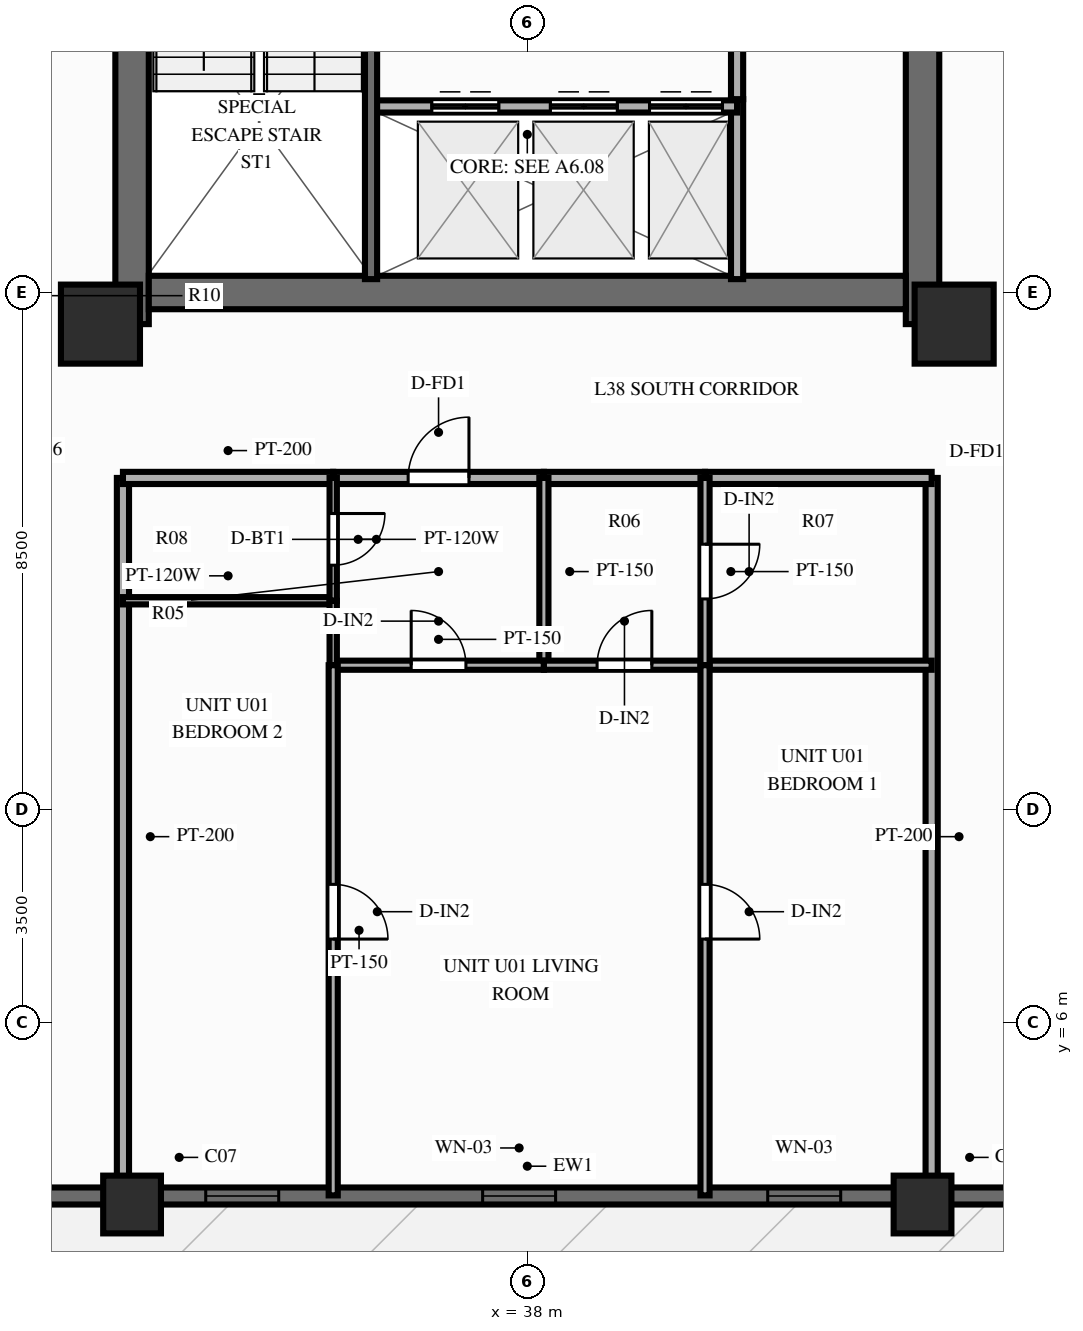
"""IFC4 building model, lengths in metres.
Left out: names, types, materials, properties, quantities, classifications, styles, units other than length and angle.
Written with IfcOpenShell. Run it as: python <this file> out.ifc"""

import sys

from ifc_helpers import new_model, si_unit, direction, frame, frame_2d, origin, origin_2d, place, context, subcontext, project, spatial, rectangle, extrude, source, transform, mapped, element, fill, save


model = new_model("IFC4")
c1 = context("Model", 3, precision=1e-05, world=origin(), true_north=direction((0.0, 1.0)))
c2 = subcontext(c1, "Body", "Model", "MODEL_VIEW")
j1 = project(units=[si_unit("LENGTHUNIT", "METRE"), si_unit("PLANEANGLEUNIT", "RADIAN")], contexts=[c1])
p1 = place(None, origin())
s1 = spatial("IfcSite", under=j1, at=p1, CompositionType="ELEMENT")
p2 = place(p1, origin())
s2 = spatial("IfcBuilding", under=s1, at=p2, CompositionType="ELEMENT")
p3 = place(p2, frame((0.0, 0.0, 119.85)))
s3 = spatial("IfcBuildingStorey", under=s2, at=p3, CompositionType="ELEMENT", Elevation=119.85)
p4 = place(p3, frame((31.5, 17.48, 0.0), z_axis=(0.0, 0.0, 1.0), x_axis=(0.0, 1.0, 0.0)))
e1 = element("IfcWall", 1, at=p4, inside=s3, PredefinedType="SHEAR", context=c2, shape_type="SweptSolid", body=[
    extrude(rectangle(XDim=19.04, YDim=0.55, at=frame_2d((9.52, 0.0))), origin(), (0.0, 0.0, 1.0), 3.0),
])
p5 = place(p4, frame((6.32, 0.0, 0.0)))
e2 = element("IfcOpeningElement", 2, at=p5, cuts=e1, PredefinedType="OPENING", context=c2, shape_type="SweptSolid", body=[
    extrude(rectangle(XDim=1.1, YDim=2.15, at=frame_2d((0.55, 1.075))), frame((0.0, 0.287, 0.0), z_axis=(0.0, -1.0, 0.0), x_axis=(1.0, 0.0, 0.0)), (0.0, 0.0, 1.0), 0.574),
])
p6 = place(p3, frame((44.5, 17.48, 0.0), z_axis=(0.0, 0.0, 1.0), x_axis=(0.0, 1.0, 0.0)))
e3 = element("IfcWall", 3, at=p6, inside=s3, PredefinedType="SHEAR", context=c2, shape_type="SweptSolid", body=[
    extrude(rectangle(XDim=19.04, YDim=0.55, at=frame_2d((9.52, 0.0))), origin(), (0.0, 0.0, 1.0), 3.0),
])
p7 = place(p6, frame((12.67, 0.0, 0.0), z_axis=(0.0, 0.0, 1.0), x_axis=(-1.0, 0.0, 0.0)))
e4 = element("IfcOpeningElement", 4, at=p7, cuts=e3, PredefinedType="OPENING", context=c2, shape_type="SweptSolid", body=[
    extrude(rectangle(XDim=1.1, YDim=2.15, at=frame_2d((0.55, 1.075))), frame((0.0, 0.287, 0.0), z_axis=(0.0, -1.0, 0.0), x_axis=(1.0, 0.0, 0.0)), (0.0, 0.0, 1.0), 0.574),
])
p8 = place(p3, frame((31.775, 18.0, 0.0), z_axis=(0.0, 0.0, 1.0), x_axis=(1.0, 0.0, 0.0)))
e5 = element("IfcWall", 5, at=p8, inside=s3, PredefinedType="SHEAR", context=c2, shape_type="SweptSolid", body=[
    extrude(rectangle(XDim=12.45, YDim=0.55, at=frame_2d((6.225, 0.0))), origin(), (0.0, 0.0, 1.0), 3.0),
])
m1 = source(origin(), c2, "Body", "SweptSolid", [
    extrude(rectangle(XDim=1.3, YDim=1.3, at=origin_2d()), origin(), (0.0, 0.0, 1.0), 3.0),
])
for number, where, z_axis, x_axis in (
    (6, (30.98, 17.48, 0.0), (0.0, 0.0, 1.0), (1.0, 0.0, 0.0)),
    (7, (45.02, 17.48, 0.0), (0.0, 0.0, 1.0), (1.0, 0.0, 0.0)),
):
    element("IfcColumn", number, at=place(p3, frame(where, z_axis=z_axis, x_axis=x_axis)), inside=s3, PredefinedType="COLUMN", context=c2, shape_type="MappedRepresentation", body=[
        mapped(m1, transform((0.0, 0.0, 0.0), scale=1.0)),
    ])
m2 = source(origin(), c2, "Body", "SweptSolid", [
    extrude(rectangle(XDim=0.95, YDim=0.95, at=origin_2d()), origin(), (0.0, 0.0, 1.0), 3.0),
])
for number, where, z_axis, x_axis in (
    (8, (31.5, 3.0, 0.0), (0.0, 0.0, 1.0), (1.0, 0.0, 0.0)),
    (9, (44.5, 3.0, 0.0), (0.0, 0.0, 1.0), (1.0, 0.0, 0.0)),
):
    element("IfcColumn", number, at=place(p3, frame(where, z_axis=z_axis, x_axis=x_axis)), inside=s3, PredefinedType="COLUMN", context=c2, shape_type="MappedRepresentation", body=[
        mapped(m2, transform((0.0, 0.0, 0.0), scale=1.0)),
    ])
p9 = place(p3, frame((16.2, 3.14, 0.0), z_axis=(0.0, 0.0, 1.0), x_axis=(1.0, 0.0, 0.0)))
e10 = element("IfcWall", 10, at=p9, inside=s3, PredefinedType="SOLIDWALL", context=c2, shape_type="SweptSolid", body=[
    extrude(rectangle(XDim=43.6, YDim=0.28, at=frame_2d((21.8, 0.0))), origin(), (0.0, 0.0, 1.0), 2.28),
])
p10 = place(p9, frame((8.2, 0.0, 0.0), z_axis=(0.0, 0.0, 1.0), x_axis=(-1.0, 0.0, 0.0)))
e11 = element("IfcOpeningElement", 11, at=p10, cuts=e10, PredefinedType="OPENING", context=c2, shape_type="SweptSolid", body=[
    extrude(rectangle(XDim=1.1, YDim=2.15, at=frame_2d((0.55, 1.075))), frame((0.0, 0.152, 0.0), z_axis=(0.0, -1.0, 0.0), x_axis=(1.0, 0.0, 0.0)), (0.0, 0.0, 1.0), 0.304),
])
p11 = place(p9, frame((16.511, 0.0, 0.25)))
e12 = element("IfcOpeningElement", 12, at=p11, cuts=e10, PredefinedType="OPENING", context=c2, shape_type="SweptSolid", body=[
    extrude(rectangle(XDim=1.2, YDim=1.5, at=frame_2d((0.6, 0.75))), frame((0.0, 0.152, 0.0), z_axis=(0.0, -1.0, 0.0), x_axis=(1.0, 0.0, 0.0)), (0.0, 0.0, 1.0), 0.304),
])
p12 = place(p9, frame((21.065, 0.0, 0.25)))
e13 = element("IfcOpeningElement", 13, at=p12, cuts=e10, PredefinedType="OPENING", context=c2, shape_type="SweptSolid", body=[
    extrude(rectangle(XDim=1.2, YDim=1.5, at=frame_2d((0.6, 0.75))), frame((0.0, 0.152, 0.0), z_axis=(0.0, -1.0, 0.0), x_axis=(1.0, 0.0, 0.0)), (0.0, 0.0, 1.0), 0.304),
])
p13 = place(p9, frame((25.754, 0.0, 0.25)))
e14 = element("IfcOpeningElement", 14, at=p13, cuts=e10, PredefinedType="OPENING", context=c2, shape_type="SweptSolid", body=[
    extrude(rectangle(XDim=1.2, YDim=1.5, at=frame_2d((0.6, 0.75))), frame((0.0, 0.152, 0.0), z_axis=(0.0, -1.0, 0.0), x_axis=(1.0, 0.0, 0.0)), (0.0, 0.0, 1.0), 0.304),
])
p14 = place(p9, frame((35.35, 0.0, 0.25)))
e15 = element("IfcOpeningElement", 15, at=p14, cuts=e10, PredefinedType="OPENING", context=c2, shape_type="SweptSolid", body=[
    extrude(rectangle(XDim=1.2, YDim=1.5, at=frame_2d((0.6, 0.75))), frame((0.0, 0.152, 0.0), z_axis=(0.0, -1.0, 0.0), x_axis=(1.0, 0.0, 0.0)), (0.0, 0.0, 1.0), 0.304),
])
p15 = place(p3, frame((41.45, 18.22, 0.0), z_axis=(0.0, 0.0, 1.0), x_axis=(0.0, 1.0, 0.0)))
e16 = element("IfcWall", 16, at=p15, inside=s3, PredefinedType="PARTITIONING", context=c2, shape_type="SweptSolid", body=[
    extrude(rectangle(XDim=2.96, YDim=0.2, at=frame_2d((1.48, 0.0))), origin(), (0.0, 0.0, 1.0), 2.79),
])
p16 = place(p3, frame((41.45, 21.18, 0.0), z_axis=(0.0, 0.0, 1.0), x_axis=(0.0, 1.0, 0.0)))
e17 = element("IfcWall", 17, at=p16, inside=s3, PredefinedType="PARTITIONING", context=c2, shape_type="SweptSolid", body=[
    extrude(rectangle(XDim=7.42, YDim=0.2, at=frame_2d((3.71, 0.0))), origin(), (0.0, 0.0, 1.0), 2.79),
])
p17 = place(p16, frame((2.6, 0.0, 0.0)))
e18 = element("IfcOpeningElement", 18, at=p17, cuts=e17, PredefinedType="OPENING", context=c2, shape_type="SweptSolid", body=[
    extrude(rectangle(XDim=0.9, YDim=2.1, at=frame_2d((0.45, 1.05))), frame((0.0, 0.112, 0.0), z_axis=(0.0, -1.0, 0.0), x_axis=(1.0, 0.0, 0.0)), (0.0, 0.0, 1.0), 0.224),
])
p18 = place(p3, frame((35.43, 21.06, 0.0), z_axis=(0.0, 0.0, 1.0), x_axis=(1.0, 0.0, 0.0)))
e19 = element("IfcWall", 19, at=p18, inside=s3, PredefinedType="PARTITIONING", context=c2, shape_type="SweptSolid", body=[
    extrude(rectangle(XDim=6.02, YDim=0.2, at=frame_2d((3.01, 0.0))), origin(), (0.0, 0.0, 1.0), 2.79),
])
p19 = place(p18, frame((1.0, 0.0, 0.0)))
e20 = element("IfcOpeningElement", 20, at=p19, cuts=e19, PredefinedType="OPENING", context=c2, shape_type="SweptSolid", body=[
    extrude(rectangle(XDim=1.1, YDim=2.15, at=frame_2d((0.55, 1.075))), frame((0.0, 0.112, 0.0), z_axis=(0.0, -1.0, 0.0), x_axis=(1.0, 0.0, 0.0)), (0.0, 0.0, 1.0), 0.224),
])
p20 = place(p18, frame((2.95, 0.0, 0.0)))
e21 = element("IfcOpeningElement", 21, at=p20, cuts=e19, PredefinedType="OPENING", context=c2, shape_type="SweptSolid", body=[
    extrude(rectangle(XDim=1.1, YDim=2.15, at=frame_2d((0.55, 1.075))), frame((0.0, 0.112, 0.0), z_axis=(0.0, -1.0, 0.0), x_axis=(1.0, 0.0, 0.0)), (0.0, 0.0, 1.0), 0.224),
])
p21 = place(p18, frame((4.58, 0.0, 0.0)))
e22 = element("IfcOpeningElement", 22, at=p21, cuts=e19, PredefinedType="OPENING", context=c2, shape_type="SweptSolid", body=[
    extrude(rectangle(XDim=1.2, YDim=2.15, at=frame_2d((0.6, 1.075))), frame((0.0, 0.112, 0.0), z_axis=(0.0, -1.0, 0.0), x_axis=(1.0, 0.0, 0.0)), (0.0, 0.0, 1.0), 0.224),
])
p22 = place(p3, frame((35.43, 18.22, 0.0), z_axis=(0.0, 0.0, 1.0), x_axis=(0.0, 1.0, 0.0)))
e23 = element("IfcWall", 23, at=p22, inside=s3, PredefinedType="SOLIDWALL", context=c2, shape_type="SweptSolid", body=[
    extrude(rectangle(XDim=7.22, YDim=0.2, at=frame_2d((3.61, 0.0))), origin(), (0.0, 0.0, 1.0), 2.79),
])
p23 = place(p22, frame((6.68, 0.0, 0.0), z_axis=(0.0, 0.0, 1.0), x_axis=(-1.0, 0.0, 0.0)))
e24 = element("IfcOpeningElement", 24, at=p23, cuts=e23, PredefinedType="OPENING", context=c2, shape_type="SweptSolid", body=[
    extrude(rectangle(XDim=1.1, YDim=2.15, at=frame_2d((0.55, 1.075))), frame((0.0, 0.112, 0.0), z_axis=(0.0, -1.0, 0.0), x_axis=(1.0, 0.0, 0.0)), (0.0, 0.0, 1.0), 0.224),
])
for number, where, z_axis, x_axis in (
    (25, (31.35, 14.95, 0.0), (0.0, 0.0, 1.0), (0.0, -1.0, 0.0)),
    (26, (44.65, 14.95, 0.0), (0.0, 0.0, 1.0), (0.0, -1.0, 0.0)),
):
    element("IfcWall", number, at=place(p3, frame(where, z_axis=z_axis, x_axis=x_axis)), inside=s3, PredefinedType="PARTITIONING", context=c2, shape_type="SweptSolid", body=[
        extrude(rectangle(XDim=11.8, YDim=0.2, at=frame_2d((5.9, 0.0))), origin(), (0.0, 0.0, 1.0), 2.34),
    ])
p24 = place(p3, frame((31.35, 14.95, 0.0), z_axis=(0.0, 0.0, 1.0), x_axis=(1.0, 0.0, 0.0)))
e27 = element("IfcWall", 27, at=p24, inside=s3, PredefinedType="PARTITIONING", context=c2, shape_type="SweptSolid", body=[
    extrude(rectangle(XDim=3.458, YDim=0.2, at=frame_2d((1.729, 0.0))), origin(), (0.0, 0.0, 1.0), 2.79),
])
p25 = place(p3, frame((34.808, 14.95, 0.0), z_axis=(0.0, 0.0, 1.0), x_axis=(1.0, 0.0, 0.0)))
e28 = element("IfcWall", 28, at=p25, inside=s3, PredefinedType="PARTITIONING", context=c2, shape_type="SweptSolid", body=[
    extrude(rectangle(XDim=3.465, YDim=0.2, at=frame_2d((1.732, 0.0))), origin(), (0.0, 0.0, 1.0), 2.79),
])
p26 = place(p25, frame((1.232, 0.0, 0.0)))
e29 = element("IfcOpeningElement", 29, at=p26, cuts=e28, PredefinedType="OPENING", context=c2, shape_type="SweptSolid", body=[
    extrude(rectangle(XDim=1.0, YDim=2.15, at=frame_2d((0.5, 1.075))), frame((0.0, 0.112, 0.0), z_axis=(0.0, -1.0, 0.0), x_axis=(1.0, 0.0, 0.0)), (0.0, 0.0, 1.0), 0.224),
])
p27 = place(p3, frame((38.273, 14.95, 0.0), z_axis=(0.0, 0.0, 1.0), x_axis=(1.0, 0.0, 0.0)))
e30 = element("IfcWall", 30, at=p27, inside=s3, PredefinedType="PARTITIONING", context=c2, shape_type="SweptSolid", body=[
    extrude(rectangle(XDim=2.65, YDim=0.2, at=frame_2d((1.325, 0.0))), origin(), (0.0, 0.0, 1.0), 2.79),
])
p28 = place(p3, frame((38.273, 14.95, 0.0), z_axis=(0.0, 0.0, 1.0), x_axis=(0.0, -1.0, 0.0)))
e31 = element("IfcWall", 31, at=p28, inside=s3, PredefinedType="PARTITIONING", context=c2, shape_type="SweptSolid", body=[
    extrude(rectangle(XDim=3.08, YDim=0.15, at=frame_2d((1.54, 0.0))), origin(), (0.0, 0.0, 1.0), 2.79),
])
p29 = place(p3, frame((34.808, 11.87, 0.0), z_axis=(0.0, 0.0, 1.0), x_axis=(1.0, 0.0, 0.0)))
e32 = element("IfcWall", 32, at=p29, inside=s3, PredefinedType="PARTITIONING", context=c2, shape_type="SweptSolid", body=[
    extrude(rectangle(XDim=3.465, YDim=0.15, at=frame_2d((1.732, 0.0))), origin(), (0.0, 0.0, 1.0), 2.79),
])
p30 = place(p29, frame((1.282, 0.0, 0.0)))
e33 = element("IfcOpeningElement", 33, at=p30, cuts=e32, PredefinedType="OPENING", context=c2, shape_type="SweptSolid", body=[
    extrude(rectangle(XDim=0.9, YDim=2.1, at=frame_2d((0.45, 1.05))), frame((0.0, 0.087, 0.0), z_axis=(0.0, -1.0, 0.0), x_axis=(1.0, 0.0, 0.0)), (0.0, 0.0, 1.0), 0.174),
])
p31 = place(p3, frame((38.273, 11.87, 0.0), z_axis=(0.0, 0.0, 1.0), x_axis=(1.0, 0.0, 0.0)))
e34 = element("IfcWall", 34, at=p31, inside=s3, PredefinedType="PARTITIONING", context=c2, shape_type="SweptSolid", body=[
    extrude(rectangle(XDim=2.65, YDim=0.15, at=frame_2d((1.325, 0.0))), origin(), (0.0, 0.0, 1.0), 2.79),
])
p32 = place(p31, frame((0.875, 0.0, 0.0)))
e35 = element("IfcOpeningElement", 35, at=p32, cuts=e34, PredefinedType="OPENING", context=c2, shape_type="SweptSolid", body=[
    extrude(rectangle(XDim=0.9, YDim=2.1, at=frame_2d((0.45, 1.05))), frame((0.0, 0.087, 0.0), z_axis=(0.0, -1.0, 0.0), x_axis=(1.0, 0.0, 0.0)), (0.0, 0.0, 1.0), 0.174),
])
p33 = place(p3, frame((40.923, 14.95, 0.0), z_axis=(0.0, 0.0, 1.0), x_axis=(1.0, 0.0, 0.0)))
e36 = element("IfcWall", 36, at=p33, inside=s3, PredefinedType="PARTITIONING", context=c2, shape_type="SweptSolid", body=[
    extrude(rectangle(XDim=3.727, YDim=0.2, at=frame_2d((1.864, 0.0))), origin(), (0.0, 0.0, 1.0), 2.79),
])
p34 = place(p3, frame((31.35, 12.93, 0.0), z_axis=(0.0, 0.0, 1.0), x_axis=(1.0, 0.0, 0.0)))
e37 = element("IfcWall", 37, at=p34, inside=s3, PredefinedType="PARTITIONING", context=c2, shape_type="SweptSolid", body=[
    extrude(rectangle(XDim=3.458, YDim=0.12, at=frame_2d((1.729, 0.0))), origin(), (0.0, 0.0, 1.0), 2.79),
])
p35 = place(p3, frame((40.923, 11.87, 0.0), z_axis=(0.0, 0.0, 1.0), x_axis=(1.0, 0.0, 0.0)))
e38 = element("IfcWall", 38, at=p35, inside=s3, PredefinedType="PARTITIONING", context=c2, shape_type="SweptSolid", body=[
    extrude(rectangle(XDim=3.727, YDim=0.15, at=frame_2d((1.864, 0.0))), origin(), (0.0, 0.0, 1.0), 2.79),
])
p36 = place(p3, frame((34.808, 14.95, 0.0), z_axis=(0.0, 0.0, 1.0), x_axis=(0.0, -1.0, 0.0)))
e39 = element("IfcWall", 39, at=p36, inside=s3, PredefinedType="PARTITIONING", context=c2, shape_type="SweptSolid", body=[
    extrude(rectangle(XDim=2.02, YDim=0.12, at=frame_2d((1.01, 0.0))), origin(), (0.0, 0.0, 1.0), 2.79),
])
p37 = place(p36, frame((0.585, 0.0, 0.0)))
e40 = element("IfcOpeningElement", 40, at=p37, cuts=e39, PredefinedType="OPENING", context=c2, shape_type="SweptSolid", body=[
    extrude(rectangle(XDim=0.85, YDim=2.05, at=frame_2d((0.425, 1.025))), frame((0.0, 0.072, 0.0), z_axis=(0.0, -1.0, 0.0), x_axis=(1.0, 0.0, 0.0)), (0.0, 0.0, 1.0), 0.144),
])
p38 = place(p3, frame((34.808, 12.93, 0.0), z_axis=(0.0, 0.0, 1.0), x_axis=(0.0, -1.0, 0.0)))
e41 = element("IfcWall", 41, at=p38, inside=s3, PredefinedType="PARTITIONING", context=c2, shape_type="SweptSolid", body=[
    extrude(rectangle(XDim=1.06, YDim=0.12, at=frame_2d((0.53, 0.0))), origin(), (0.0, 0.0, 1.0), 2.79),
])
p39 = place(p3, frame((34.808, 11.87, 0.0), z_axis=(0.0, 0.0, 1.0), x_axis=(0.0, -1.0, 0.0)))
e42 = element("IfcWall", 42, at=p39, inside=s3, PredefinedType="PARTITIONING", context=c2, shape_type="SweptSolid", body=[
    extrude(rectangle(XDim=8.72, YDim=0.15, at=frame_2d((4.36, 0.0))), origin(), (0.0, 0.0, 1.0), 2.79),
])
p40 = place(p39, frame((3.604, 0.0, 0.0)))
e43 = element("IfcOpeningElement", 43, at=p40, cuts=e42, PredefinedType="OPENING", context=c2, shape_type="SweptSolid", body=[
    extrude(rectangle(XDim=0.9, YDim=2.1, at=frame_2d((0.45, 1.05))), frame((0.0, 0.087, 0.0), z_axis=(0.0, -1.0, 0.0), x_axis=(1.0, 0.0, 0.0)), (0.0, 0.0, 1.0), 0.174),
])
p41 = place(p3, frame((40.923, 14.95, 0.0), z_axis=(0.0, 0.0, 1.0), x_axis=(0.0, -1.0, 0.0)))
e44 = element("IfcWall", 44, at=p41, inside=s3, PredefinedType="PARTITIONING", context=c2, shape_type="SweptSolid", body=[
    extrude(rectangle(XDim=3.08, YDim=0.15, at=frame_2d((1.54, 0.0))), origin(), (0.0, 0.0, 1.0), 2.79),
])
p42 = place(p41, frame((1.09, 0.0, 0.0)))
e45 = element("IfcOpeningElement", 45, at=p42, cuts=e44, PredefinedType="OPENING", context=c2, shape_type="SweptSolid", body=[
    extrude(rectangle(XDim=0.9, YDim=2.1, at=frame_2d((0.45, 1.05))), frame((0.0, 0.087, 0.0), z_axis=(0.0, -1.0, 0.0), x_axis=(1.0, 0.0, 0.0)), (0.0, 0.0, 1.0), 0.174),
])
p43 = place(p3, frame((40.923, 11.87, 0.0), z_axis=(0.0, 0.0, 1.0), x_axis=(0.0, -1.0, 0.0)))
e46 = element("IfcWall", 46, at=p43, inside=s3, PredefinedType="PARTITIONING", context=c2, shape_type="SweptSolid", body=[
    extrude(rectangle(XDim=8.72, YDim=0.15, at=frame_2d((4.36, 0.0))), origin(), (0.0, 0.0, 1.0), 2.79),
])
p44 = place(p43, frame((3.604, 0.0, 0.0)))
e47 = element("IfcOpeningElement", 47, at=p44, cuts=e46, PredefinedType="OPENING", context=c2, shape_type="SweptSolid", body=[
    extrude(rectangle(XDim=0.9, YDim=2.1, at=frame_2d((0.45, 1.05))), frame((0.0, 0.087, 0.0), z_axis=(0.0, -1.0, 0.0), x_axis=(1.0, 0.0, 0.0)), (0.0, 0.0, 1.0), 0.174),
])
m3 = source(origin(), c2, "Body", "SweptSolid", [
    extrude(rectangle(XDim=1.2, YDim=1.5, at=frame_2d((0.6, 0.75))), frame((0.0, 0.03, 0.0), z_axis=(0.0, -1.0, 0.0), x_axis=(1.0, 0.0, 0.0)), (0.0, 0.0, 1.0), 0.06),
])
p45 = place(p11, origin())
e48 = element("IfcWindow", 48, at=p45, inside=s3, PartitioningType="SINGLE_PANEL", PredefinedType="WINDOW", context=c2, shape_type="MappedRepresentation", body=[
    mapped(m3, transform((0.0, 0.0, 0.0), scale=1.0)),
])
fill(e12, e48)
p46 = place(p12, origin())
e49 = element("IfcWindow", 49, at=p46, inside=s3, PartitioningType="SINGLE_PANEL", PredefinedType="WINDOW", context=c2, shape_type="MappedRepresentation", body=[
    mapped(m3, transform((0.0, 0.0, 0.0), scale=1.0)),
])
fill(e13, e49)
p47 = place(p13, origin())
e50 = element("IfcWindow", 50, at=p47, inside=s3, PartitioningType="SINGLE_PANEL", PredefinedType="WINDOW", context=c2, shape_type="MappedRepresentation", body=[
    mapped(m3, transform((0.0, 0.0, 0.0), scale=1.0)),
])
fill(e14, e50)
m4 = source(origin(), c2, "Body", "SweptSolid", [
    extrude(rectangle(XDim=1.1, YDim=2.15, at=frame_2d((0.55, 1.075))), frame((0.0, 0.025, 0.0), z_axis=(0.0, -1.0, 0.0), x_axis=(1.0, 0.0, 0.0)), (0.0, 0.0, 1.0), 0.05),
])
p48 = place(p19, origin())
e51 = element("IfcDoor", 51, at=p48, inside=s3, OperationType="DOUBLE_DOOR_SLIDING", PredefinedType="DOOR", context=c2, shape_type="MappedRepresentation", body=[
    mapped(m4, transform((0.0, 0.0, 0.0), scale=1.0)),
])
fill(e20, e51)
p49 = place(p20, origin())
e52 = element("IfcDoor", 52, at=p49, inside=s3, OperationType="DOUBLE_DOOR_SLIDING", PredefinedType="DOOR", context=c2, shape_type="MappedRepresentation", body=[
    mapped(m4, transform((0.0, 0.0, 0.0), scale=1.0)),
])
fill(e21, e52)
m5 = source(origin(), c2, "Body", "SweptSolid", [
    extrude(rectangle(XDim=1.2, YDim=2.15, at=frame_2d((0.6, 1.075))), frame((0.0, 0.025, 0.0), z_axis=(0.0, -1.0, 0.0), x_axis=(1.0, 0.0, 0.0)), (0.0, 0.0, 1.0), 0.05),
])
p50 = place(p21, origin())
e53 = element("IfcDoor", 53, at=p50, inside=s3, OperationType="DOUBLE_DOOR_SLIDING", PredefinedType="DOOR", context=c2, shape_type="MappedRepresentation", body=[
    mapped(m5, transform((0.0, 0.0, 0.0), scale=1.0)),
])
fill(e22, e53)
m6 = source(origin(), c2, "Body", "SweptSolid", [
    extrude(rectangle(XDim=1.0, YDim=2.15, at=frame_2d((0.5, 1.075))), frame((0.0, 0.025, 0.0), z_axis=(0.0, -1.0, 0.0), x_axis=(1.0, 0.0, 0.0)), (0.0, 0.0, 1.0), 0.05),
])
p51 = place(p26, origin())
e54 = element("IfcDoor", 54, at=p51, inside=s3, OperationType="SINGLE_SWING_RIGHT", PredefinedType="DOOR", context=c2, shape_type="MappedRepresentation", body=[
    mapped(m6, transform((0.0, 0.0, 0.0), scale=1.0)),
])
fill(e29, e54)
m7 = source(origin(), c2, "Body", "SweptSolid", [
    extrude(rectangle(XDim=0.9, YDim=2.1, at=frame_2d((0.45, 1.05))), frame((0.0, 0.025, 0.0), z_axis=(0.0, -1.0, 0.0), x_axis=(1.0, 0.0, 0.0)), (0.0, 0.0, 1.0), 0.05),
])
p52 = place(p30, origin())
e55 = element("IfcDoor", 55, at=p52, inside=s3, OperationType="SINGLE_SWING_LEFT", PredefinedType="DOOR", context=c2, shape_type="MappedRepresentation", body=[
    mapped(m7, transform((0.0, 0.0, 0.0), scale=1.0)),
])
fill(e33, e55)
p53 = place(p32, origin())
e56 = element("IfcDoor", 56, at=p53, inside=s3, OperationType="SINGLE_SWING_RIGHT", PredefinedType="DOOR", context=c2, shape_type="MappedRepresentation", body=[
    mapped(m7, transform((0.0, 0.0, 0.0), scale=1.0)),
])
fill(e35, e56)
m8 = source(origin(), c2, "Body", "SweptSolid", [
    extrude(rectangle(XDim=0.85, YDim=2.05, at=frame_2d((0.425, 1.025))), frame((0.0, 0.025, 0.0), z_axis=(0.0, -1.0, 0.0), x_axis=(1.0, 0.0, 0.0)), (0.0, 0.0, 1.0), 0.05),
])
p54 = place(p37, origin())
e57 = element("IfcDoor", 57, at=p54, inside=s3, OperationType="SINGLE_SWING_LEFT", PredefinedType="DOOR", context=c2, shape_type="MappedRepresentation", body=[
    mapped(m8, transform((0.0, 0.0, 0.0), scale=1.0)),
])
fill(e40, e57)
p55 = place(p40, origin())
e58 = element("IfcDoor", 58, at=p55, inside=s3, OperationType="SINGLE_SWING_RIGHT", PredefinedType="DOOR", context=c2, shape_type="MappedRepresentation", body=[
    mapped(m7, transform((0.0, 0.0, 0.0), scale=1.0)),
])
fill(e43, e58)
p56 = place(p42, origin())
e59 = element("IfcDoor", 59, at=p56, inside=s3, OperationType="SINGLE_SWING_LEFT", PredefinedType="DOOR", context=c2, shape_type="MappedRepresentation", body=[
    mapped(m7, transform((0.0, 0.0, 0.0), scale=1.0)),
])
fill(e45, e59)
p57 = place(p44, origin())
e60 = element("IfcDoor", 60, at=p57, inside=s3, OperationType="SINGLE_SWING_RIGHT", PredefinedType="DOOR", context=c2, shape_type="MappedRepresentation", body=[
    mapped(m7, transform((0.0, 0.0, 0.0), scale=1.0)),
])
fill(e47, e60)
save(model, sys.argv[1])
